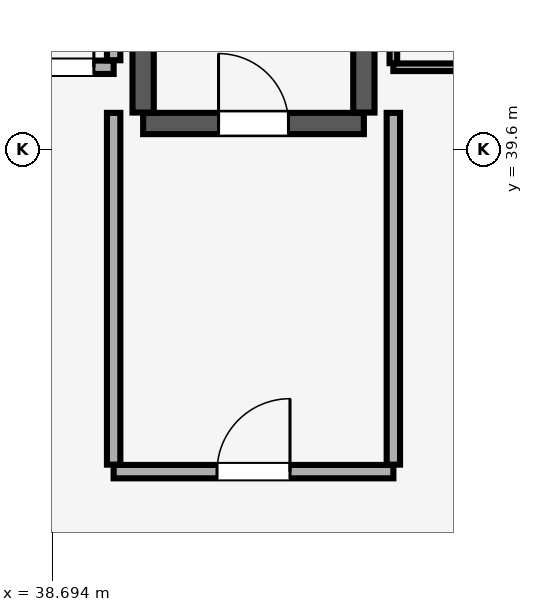
"""IFC4 building model, lengths in metres.
Left out: names, types, materials, properties, quantities, classifications, styles, units other than length and angle.
Written with IfcOpenShell. Run it as: python <this file> out.ifc"""

import sys

from ifc_helpers import new_model, si_unit, direction, frame, frame_2d, origin, place, context, subcontext, project, spatial, rectangle, extrude, element, fill, save


model = new_model("IFC4")
c1 = context("Model", 3, precision=1e-05, world=origin(), true_north=direction((0.0, 1.0)))
c2 = subcontext(c1, "Body", "Model", "MODEL_VIEW")
j1 = project(units=[si_unit("LENGTHUNIT", "METRE"), si_unit("PLANEANGLEUNIT", "RADIAN")], contexts=[c1])
p1 = place(None, origin())
s1 = spatial("IfcSite", under=j1, at=p1, CompositionType="ELEMENT")
p2 = place(p1, origin())
s2 = spatial("IfcBuilding", under=s1, at=p2, CompositionType="ELEMENT")
p3 = place(p2, frame((0.0, 0.0, 14.0)))
s3 = spatial("IfcBuildingStorey", under=s2, at=p3, CompositionType="ELEMENT", Elevation=14.0)
p4 = place(p3, frame((40.185, 40.025, 0.0), z_axis=(0.0, 0.0, 1.0), x_axis=(1.0, 0.0, 0.0)))
e1 = element("IfcWall", 1, at=p4, inside=s3, PredefinedType="SHEAR", context=c2, shape_type="SweptSolid", body=[
    extrude(rectangle(XDim=3.63, YDim=0.35, at=frame_2d((1.815, 0.0))), origin(), (0.0, 0.0, 1.0), 5.08),
])
p5 = place(p4, frame((1.24, 0.0, 0.0)))
e2 = element("IfcOpeningElement", 2, at=p5, cuts=e1, PredefinedType="OPENING", context=c2, shape_type="SweptSolid", body=[
    extrude(rectangle(XDim=1.15, YDim=2.15, at=frame_2d((0.575, 1.075))), frame((0.0, 0.185, 0.0), z_axis=(0.0, -1.0, 0.0), x_axis=(1.0, 0.0, 0.0)), (0.0, 0.0, 1.0), 0.37),
])
for number, where, z_axis, x_axis in (
    (3, (40.185, 40.205, 0.0), (0.0, 0.0, 1.0), (0.0, 1.0, 0.0)),
    (4, (43.815, 40.205, 0.0), (0.0, 0.0, 1.0), (0.0, 1.0, 0.0)),
):
    element("IfcWall", number, at=place(p3, frame(where, z_axis=z_axis, x_axis=x_axis)), inside=s3, PredefinedType="SHEAR", context=c2, shape_type="SweptSolid", body=[
        extrude(rectangle(XDim=8.09, YDim=0.35, at=frame_2d((4.045, 0.0))), origin(), (0.0, 0.0, 1.0), 5.08),
    ])
p6 = place(p3, frame((39.7, 34.3, 0.0), z_axis=(0.0, 0.0, 1.0), x_axis=(1.0, 0.0, 0.0)))
e5 = element("IfcWall", 5, at=p6, inside=s3, PredefinedType="PARTITIONING", context=c2, shape_type="SweptSolid", body=[
    extrude(rectangle(XDim=4.6, YDim=0.22, at=frame_2d((2.3, 0.0))), origin(), (0.0, 0.0, 1.0), 5.08),
])
p7 = place(p6, frame((1.7, 0.0, 0.0)))
e6 = element("IfcOpeningElement", 6, at=p7, cuts=e5, PredefinedType="OPENING", context=c2, shape_type="SweptSolid", body=[
    extrude(rectangle(XDim=1.2, YDim=2.15, at=frame_2d((0.6, 1.075))), frame((0.0, 0.12, 0.0), z_axis=(0.0, -1.0, 0.0), x_axis=(1.0, 0.0, 0.0)), (0.0, 0.0, 1.0), 0.24),
])
for number, where, z_axis, x_axis in (
    (7, (39.7, 34.415, 0.0), (0.0, 0.0, 1.0), (0.0, 1.0, 0.0)),
    (8, (44.3, 34.415, 0.0), (0.0, 0.0, 1.0), (0.0, 1.0, 0.0)),
):
    element("IfcWall", number, at=place(p3, frame(where, z_axis=z_axis, x_axis=x_axis)), inside=s3, PredefinedType="PARTITIONING", context=c2, shape_type="SweptSolid", body=[
        extrude(rectangle(XDim=5.785, YDim=0.22, at=frame_2d((2.893, 0.0))), origin(), (0.0, 0.0, 1.0), 5.08),
    ])
p8 = place(p3, frame((36.28, 40.95, 0.0), z_axis=(0.0, 0.0, 1.0), x_axis=(1.0, 0.0, 0.0)))
e9 = element("IfcWall", 9, at=p8, inside=s3, PredefinedType="PARTITIONING", context=c2, shape_type="SweptSolid", body=[
    extrude(rectangle(XDim=3.42, YDim=0.22, at=frame_2d((1.71, 0.0))), origin(), (0.0, 0.0, 1.0), 5.08),
])
p9 = place(p8, frame((2.245, 0.0, 0.0)))
e10 = element("IfcOpeningElement", 10, at=p9, cuts=e9, PredefinedType="OPENING", context=c2, shape_type="SweptSolid", body=[
    extrude(rectangle(XDim=0.85, YDim=2.1, at=frame_2d((0.425, 1.05))), frame((0.0, 0.12, 0.0), z_axis=(0.0, -1.0, 0.0), x_axis=(1.0, 0.0, 0.0)), (0.0, 0.0, 1.0), 0.24),
])
p10 = place(p3, frame((39.7, 41.065, 0.0), z_axis=(0.0, 0.0, 1.0), x_axis=(0.0, 1.0, 0.0)))
e11 = element("IfcWall", 11, at=p10, inside=s3, PredefinedType="PARTITIONING", context=c2, shape_type="SweptSolid", body=[
    extrude(rectangle(XDim=7.12, YDim=0.22, at=frame_2d((3.56, 0.0))), origin(), (0.0, 0.0, 1.0), 5.08),
])
p11 = place(p3, frame((44.3, 40.95, 0.0), z_axis=(0.0, 0.0, 1.0), x_axis=(1.0, 0.0, 0.0)))
e12 = element("IfcWall", 12, at=p11, inside=s3, PredefinedType="PARTITIONING", context=c2, shape_type="SweptSolid", body=[
    extrude(rectangle(XDim=4.6, YDim=0.125, at=frame_2d((2.3, 0.0))), origin(), (0.0, 0.0, 1.0), 5.08),
])
p12 = place(p11, frame((2.85, 0.0, 0.0)))
e13 = element("IfcOpeningElement", 13, at=p12, cuts=e12, PredefinedType="OPENING", context=c2, shape_type="SweptSolid", body=[
    extrude(rectangle(XDim=0.9, YDim=2.1, at=frame_2d((0.45, 1.05))), frame((0.0, 0.073, 0.0), z_axis=(0.0, -1.0, 0.0), x_axis=(1.0, 0.0, 0.0)), (0.0, 0.0, 1.0), 0.145),
])
p13 = place(p3, frame((44.3, 41.018, 0.0), z_axis=(0.0, 0.0, 1.0), x_axis=(0.0, 1.0, 0.0)))
e14 = element("IfcWall", 14, at=p13, inside=s3, PredefinedType="PARTITIONING", context=c2, shape_type="SweptSolid", body=[
    extrude(rectangle(XDim=3.515, YDim=0.125, at=frame_2d((1.757, 0.0))), origin(), (0.0, 0.0, 1.0), 5.08),
])
p14 = place(p5, origin())
e15 = element("IfcDoor", 15, at=p14, inside=s3, OperationType="SINGLE_SWING_LEFT", PredefinedType="DOOR", context=c2, shape_type="SweptSolid", body=[
    extrude(rectangle(XDim=1.15, YDim=2.15, at=frame_2d((0.575, 1.075))), frame((0.0, 0.025, 0.0), z_axis=(0.0, -1.0, 0.0), x_axis=(1.0, 0.0, 0.0)), (0.0, 0.0, 1.0), 0.05),
])
fill(e2, e15)
p15 = place(p7, origin())
e16 = element("IfcDoor", 16, at=p15, inside=s3, OperationType="SINGLE_SWING_RIGHT", PredefinedType="DOOR", context=c2, shape_type="SweptSolid", body=[
    extrude(rectangle(XDim=1.2, YDim=2.15, at=frame_2d((0.6, 1.075))), frame((0.0, 0.025, 0.0), z_axis=(0.0, -1.0, 0.0), x_axis=(1.0, 0.0, 0.0)), (0.0, 0.0, 1.0), 0.05),
])
fill(e6, e16)
p16 = place(p9, origin())
e17 = element("IfcDoor", 17, at=p16, inside=s3, OperationType="SINGLE_SWING_RIGHT", PredefinedType="DOOR", context=c2, shape_type="SweptSolid", body=[
    extrude(rectangle(XDim=0.85, YDim=2.1, at=frame_2d((0.425, 1.05))), frame((0.0, 0.025, 0.0), z_axis=(0.0, -1.0, 0.0), x_axis=(1.0, 0.0, 0.0)), (0.0, 0.0, 1.0), 0.05),
])
fill(e10, e17)
save(model, sys.argv[1])
